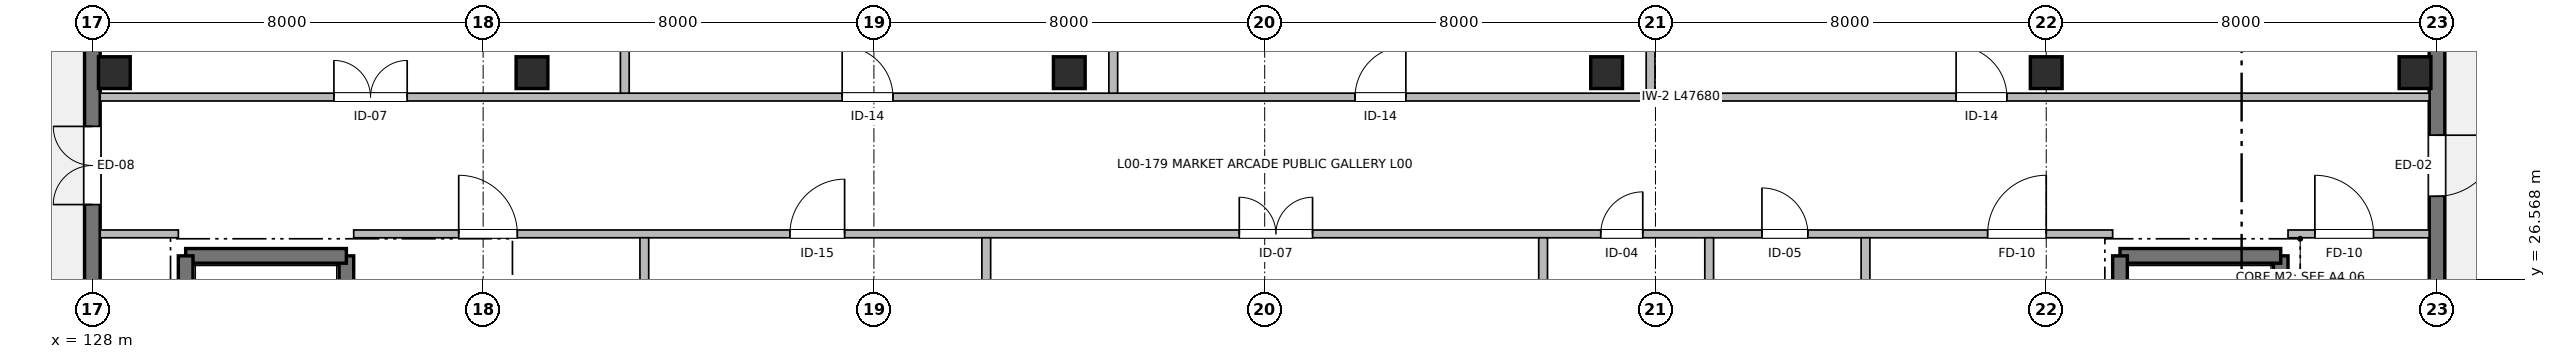
"""IFC4 building model, lengths in metres.
Left out: names, types, materials, properties, quantities, classifications, styles, units other than length and angle.
Written with IfcOpenShell. Run it as: python <this file> out.ifc"""

import sys

from ifc_helpers import new_model, si_unit, direction, frame, frame_2d, origin, origin_2d, place, context, subcontext, project, spatial, rectangle, extrude, element, fill, save


model = new_model("IFC4")
c1 = context("Model", 3, precision=1e-05, world=origin(), true_north=direction((0.0, 1.0)))
c2 = subcontext(c1, "Body", "Model", "MODEL_VIEW")
j1 = project(units=[si_unit("LENGTHUNIT", "METRE"), si_unit("PLANEANGLEUNIT", "RADIAN")], contexts=[c1])
p1 = place(None, origin())
s1 = spatial("IfcSite", under=j1, at=p1, CompositionType="ELEMENT")
p2 = place(p1, origin())
s2 = spatial("IfcBuilding", under=s1, at=p2, CompositionType="ELEMENT")
p3 = place(p2, origin())
s3 = spatial("IfcBuildingStorey", under=s2, at=p3, CompositionType="ELEMENT", Elevation=0.0)
for number, where, z_axis, x_axis in (
    (1, (128.45, 30.8, 0.0), (0.0, 0.0, 1.0), (1.0, 0.0, 0.0)),
    (2, (137.0, 30.8, 0.0), (0.0, 0.0, 1.0), (1.0, 0.0, 0.0)),
    (3, (148.0, 30.8, 0.0), (0.0, 0.0, 1.0), (1.0, 0.0, 0.0)),
    (4, (159.0, 30.8, 0.0), (0.0, 0.0, 1.0), (1.0, 0.0, 0.0)),
    (5, (168.0, 30.8, 0.0), (0.0, 0.0, 1.0), (1.0, 0.0, 0.0)),
    (6, (175.55, 30.8, 0.0), (0.0, 0.0, 1.0), (1.0, 0.0, 0.0)),
):
    element("IfcColumn", number, at=place(p3, frame(where, z_axis=z_axis, x_axis=x_axis)), inside=s3, PredefinedType="COLUMN", context=c2, shape_type="SweptSolid", body=[
        extrude(rectangle(XDim=0.65, YDim=0.65, at=origin_2d()), origin(), (0.0, 0.0, 1.0), 4.16),
    ])
p4 = place(p3, frame((128.0, 12.0, 0.0), z_axis=(0.0, 0.0, 1.0), x_axis=(0.0, 1.0, 0.0)))
e7 = element("IfcWall", 7, at=p4, inside=s3, PredefinedType="SHEAR", context=c2, shape_type="SweptSolid", body=[
    extrude(rectangle(XDim=28.0, YDim=0.32, at=frame_2d((14.0, 0.0))), origin(), (0.0, 0.0, 1.0), 3.9),
])
p5 = place(p4, frame((16.1, 0.0, 0.0)))
e8 = element("IfcOpeningElement", 8, at=p5, cuts=e7, PredefinedType="OPENING", context=c2, shape_type="SweptSolid", body=[
    extrude(rectangle(XDim=1.6, YDim=2.35, at=frame_2d((0.8, 1.175))), frame((0.0, 0.17, 0.0), z_axis=(0.0, -1.0, 0.0), x_axis=(1.0, 0.0, 0.0)), (0.0, 0.0, 1.0), 0.34),
])
p6 = place(p3, frame((176.0, 40.0, 0.0), z_axis=(0.0, 0.0, 1.0), x_axis=(0.0, -1.0, 0.0)))
e9 = element("IfcWall", 9, at=p6, inside=s3, PredefinedType="SHEAR", context=c2, shape_type="SweptSolid", body=[
    extrude(rectangle(XDim=28.0, YDim=0.32, at=frame_2d((14.0, 0.0))), origin(), (0.0, 0.0, 1.0), 3.9),
])
p7 = place(p6, frame((10.48, 0.0, 0.0)))
e10 = element("IfcOpeningElement", 10, at=p7, cuts=e9, PredefinedType="OPENING", context=c2, shape_type="SweptSolid", body=[
    extrude(rectangle(XDim=1.25, YDim=2.2, at=frame_2d((0.625, 1.1))), frame((0.0, 0.17, 0.0), z_axis=(0.0, -1.0, 0.0), x_axis=(1.0, 0.0, 0.0)), (0.0, 0.0, 1.0), 0.34),
])
p8 = place(p3, frame((133.2, 27.05, 0.0), z_axis=(0.0, 0.0, 1.0), x_axis=(0.0, -1.0, 0.0)))
e11 = element("IfcWall", 11, at=p8, inside=s3, PredefinedType="SHEAR", context=c2, shape_type="SweptSolid", body=[
    extrude(rectangle(XDim=6.9, YDim=0.3, at=frame_2d((3.45, 0.0))), origin(), (0.0, 0.0, 1.0), 4.16),
])
p9 = place(p8, frame((5.3, 0.0, 0.0)))
e12 = element("IfcOpeningElement", 12, at=p9, cuts=e11, PredefinedType="OPENING", context=c2, shape_type="SweptSolid", body=[
    extrude(rectangle(XDim=1.2, YDim=2.2, at=frame_2d((0.6, 1.1))), frame((0.0, 0.16, 0.0), z_axis=(0.0, -1.0, 0.0), x_axis=(1.0, 0.0, 0.0)), (0.0, 0.0, 1.0), 0.32),
])
p10 = place(p3, frame((129.91, 27.05, 0.0), z_axis=(0.0, 0.0, 1.0), x_axis=(1.0, 0.0, 0.0)))
e13 = element("IfcWall", 13, at=p10, inside=s3, PredefinedType="SHEAR", context=c2, shape_type="SweptSolid", body=[
    extrude(rectangle(XDim=3.29, YDim=0.3, at=frame_2d((1.645, 0.0))), origin(), (0.0, 0.0, 1.0), 4.16),
])
for number, where, z_axis, x_axis in (
    (14, (129.91, 20.15, 0.0), (0.0, 0.0, 1.0), (0.0, 1.0, 0.0)),
    (15, (172.8, 27.05, 0.0), (0.0, 0.0, 1.0), (0.0, -1.0, 0.0)),
):
    element("IfcWall", number, at=place(p3, frame(where, z_axis=z_axis, x_axis=x_axis)), inside=s3, PredefinedType="SHEAR", context=c2, shape_type="SweptSolid", body=[
        extrude(rectangle(XDim=6.9, YDim=0.3, at=frame_2d((3.45, 0.0))), origin(), (0.0, 0.0, 1.0), 4.16),
    ])
p11 = place(p3, frame((169.51, 27.05, 0.0), z_axis=(0.0, 0.0, 1.0), x_axis=(1.0, 0.0, 0.0)))
e16 = element("IfcWall", 16, at=p11, inside=s3, PredefinedType="SHEAR", context=c2, shape_type="SweptSolid", body=[
    extrude(rectangle(XDim=3.29, YDim=0.3, at=frame_2d((1.645, 0.0))), origin(), (0.0, 0.0, 1.0), 4.16),
])
p12 = place(p3, frame((169.51, 20.15, 0.0), z_axis=(0.0, 0.0, 1.0), x_axis=(0.0, 1.0, 0.0)))
e17 = element("IfcWall", 17, at=p12, inside=s3, PredefinedType="SHEAR", context=c2, shape_type="SweptSolid", body=[
    extrude(rectangle(XDim=6.9, YDim=0.3, at=frame_2d((3.45, 0.0))), origin(), (0.0, 0.0, 1.0), 4.16),
])
p13 = place(p12, frame((0.7, 0.0, 0.0)))
e18 = element("IfcOpeningElement", 18, at=p13, cuts=e17, PredefinedType="OPENING", context=c2, shape_type="SweptSolid", body=[
    extrude(rectangle(XDim=1.2, YDim=2.2, at=frame_2d((0.6, 1.1))), frame((0.0, 0.16, 0.0), z_axis=(0.0, -1.0, 0.0), x_axis=(1.0, 0.0, 0.0)), (0.0, 0.0, 1.0), 0.32),
])
p14 = place(p3, frame((128.16, 27.5, 0.0), z_axis=(0.0, 0.0, 1.0), x_axis=(1.0, 0.0, 0.0)))
e19 = element("IfcWall", 19, at=p14, inside=s3, PredefinedType="PARTITIONING", context=c2, shape_type="SweptSolid", body=[
    extrude(rectangle(XDim=1.6, YDim=0.16, at=frame_2d((0.8, 0.0))), origin(), (0.0, 0.0, 1.0), 3.89),
])
p15 = place(p3, frame((133.35, 27.5, 0.0), z_axis=(0.0, 0.0, 1.0), x_axis=(1.0, 0.0, 0.0)))
e20 = element("IfcWall", 20, at=p15, inside=s3, PredefinedType="PARTITIONING", context=c2, shape_type="SweptSolid", body=[
    extrude(rectangle(XDim=36.01, YDim=0.16, at=frame_2d((18.005, 0.0))), origin(), (0.0, 0.0, 1.0), 3.89),
])
p16 = place(p15, frame((2.15, 0.0, 0.0)))
e21 = element("IfcOpeningElement", 21, at=p16, cuts=e20, PredefinedType="OPENING", context=c2, shape_type="SweptSolid", body=[
    extrude(rectangle(XDim=1.2, YDim=2.2, at=frame_2d((0.6, 1.1))), frame((0.0, 0.09, 0.0), z_axis=(0.0, -1.0, 0.0), x_axis=(1.0, 0.0, 0.0)), (0.0, 0.0, 1.0), 0.18),
])
p17 = place(p15, frame((33.45, 0.0, 0.0)))
e22 = element("IfcOpeningElement", 22, at=p17, cuts=e20, PredefinedType="OPENING", context=c2, shape_type="SweptSolid", body=[
    extrude(rectangle(XDim=1.2, YDim=2.2, at=frame_2d((0.6, 1.1))), frame((0.0, 0.09, 0.0), z_axis=(0.0, -1.0, 0.0), x_axis=(1.0, 0.0, 0.0)), (0.0, 0.0, 1.0), 0.18),
])
p18 = place(p15, frame((8.93, 0.0, 0.0)))
e23 = element("IfcOpeningElement", 23, at=p18, cuts=e20, PredefinedType="OPENING", context=c2, shape_type="SweptSolid", body=[
    extrude(rectangle(XDim=1.12, YDim=2.2, at=frame_2d((0.56, 1.1))), frame((0.0, 0.09, 0.0), z_axis=(0.0, -1.0, 0.0), x_axis=(1.0, 0.0, 0.0)), (0.0, 0.0, 1.0), 0.18),
])
p19 = place(p15, frame((18.13, 0.0, 0.0)))
e24 = element("IfcOpeningElement", 24, at=p19, cuts=e20, PredefinedType="OPENING", context=c2, shape_type="SweptSolid", body=[
    extrude(rectangle(XDim=1.5, YDim=2.2, at=frame_2d((0.75, 1.1))), frame((0.0, 0.09, 0.0), z_axis=(0.0, -1.0, 0.0), x_axis=(1.0, 0.0, 0.0)), (0.0, 0.0, 1.0), 0.18),
])
p20 = place(p15, frame((25.53, 0.0, 0.0)))
e25 = element("IfcOpeningElement", 25, at=p20, cuts=e20, PredefinedType="OPENING", context=c2, shape_type="SweptSolid", body=[
    extrude(rectangle(XDim=0.86, YDim=2.1, at=frame_2d((0.43, 1.05))), frame((0.0, 0.09, 0.0), z_axis=(0.0, -1.0, 0.0), x_axis=(1.0, 0.0, 0.0)), (0.0, 0.0, 1.0), 0.18),
])
p21 = place(p15, frame((28.83, 0.0, 0.0)))
e26 = element("IfcOpeningElement", 26, at=p21, cuts=e20, PredefinedType="OPENING", context=c2, shape_type="SweptSolid", body=[
    extrude(rectangle(XDim=0.94, YDim=2.1, at=frame_2d((0.47, 1.05))), frame((0.0, 0.09, 0.0), z_axis=(0.0, -1.0, 0.0), x_axis=(1.0, 0.0, 0.0)), (0.0, 0.0, 1.0), 0.18),
])
p22 = place(p3, frame((172.95, 27.5, 0.0), z_axis=(0.0, 0.0, 1.0), x_axis=(1.0, 0.0, 0.0)))
e27 = element("IfcWall", 27, at=p22, inside=s3, PredefinedType="PARTITIONING", context=c2, shape_type="SweptSolid", body=[
    extrude(rectangle(XDim=2.89, YDim=0.16, at=frame_2d((1.445, 0.0))), origin(), (0.0, 0.0, 1.0), 3.89),
])
p23 = place(p22, frame((0.55, 0.0, 0.0)))
e28 = element("IfcOpeningElement", 28, at=p23, cuts=e27, PredefinedType="OPENING", context=c2, shape_type="SweptSolid", body=[
    extrude(rectangle(XDim=1.2, YDim=2.2, at=frame_2d((0.6, 1.1))), frame((0.0, 0.09, 0.0), z_axis=(0.0, -1.0, 0.0), x_axis=(1.0, 0.0, 0.0)), (0.0, 0.0, 1.0), 0.18),
])
p24 = place(p3, frame((128.16, 30.3, 0.0), z_axis=(0.0, 0.0, 1.0), x_axis=(1.0, 0.0, 0.0)))
e29 = element("IfcWall", 29, at=p24, inside=s3, PredefinedType="PARTITIONING", context=c2, shape_type="SweptSolid", body=[
    extrude(rectangle(XDim=47.68, YDim=0.16, at=frame_2d((23.84, 0.0))), origin(), (0.0, 0.0, 1.0), 3.89),
])
p25 = place(p24, frame((4.785, 0.0, 0.0)))
e30 = element("IfcOpeningElement", 30, at=p25, cuts=e29, PredefinedType="OPENING", context=c2, shape_type="SweptSolid", body=[
    extrude(rectangle(XDim=1.5, YDim=2.2, at=frame_2d((0.75, 1.1))), frame((0.0, 0.09, 0.0), z_axis=(0.0, -1.0, 0.0), x_axis=(1.0, 0.0, 0.0)), (0.0, 0.0, 1.0), 0.18),
])
p26 = place(p24, frame((15.19, 0.0, 0.0)))
e31 = element("IfcOpeningElement", 31, at=p26, cuts=e29, PredefinedType="OPENING", context=c2, shape_type="SweptSolid", body=[
    extrude(rectangle(XDim=1.04, YDim=2.15, at=frame_2d((0.52, 1.075))), frame((0.0, 0.09, 0.0), z_axis=(0.0, -1.0, 0.0), x_axis=(1.0, 0.0, 0.0)), (0.0, 0.0, 1.0), 0.18),
])
p27 = place(p24, frame((25.69, 0.0, 0.0)))
e32 = element("IfcOpeningElement", 32, at=p27, cuts=e29, PredefinedType="OPENING", context=c2, shape_type="SweptSolid", body=[
    extrude(rectangle(XDim=1.04, YDim=2.15, at=frame_2d((0.52, 1.075))), frame((0.0, 0.09, 0.0), z_axis=(0.0, -1.0, 0.0), x_axis=(1.0, 0.0, 0.0)), (0.0, 0.0, 1.0), 0.18),
])
p28 = place(p24, frame((37.995, 0.0, 0.0)))
e33 = element("IfcOpeningElement", 33, at=p28, cuts=e29, PredefinedType="OPENING", context=c2, shape_type="SweptSolid", body=[
    extrude(rectangle(XDim=1.04, YDim=2.15, at=frame_2d((0.52, 1.075))), frame((0.0, 0.09, 0.0), z_axis=(0.0, -1.0, 0.0), x_axis=(1.0, 0.0, 0.0)), (0.0, 0.0, 1.0), 0.18),
])
for number, where, z_axis, x_axis in (
    (34, (139.3, 12.2, 0.0), (0.0, 0.0, 1.0), (0.0, 1.0, 0.0)),
    (35, (164.3, 12.2, 0.0), (0.0, 0.0, 1.0), (0.0, 1.0, 0.0)),
):
    element("IfcWall", number, at=place(p3, frame(where, z_axis=z_axis, x_axis=x_axis)), inside=s3, PredefinedType="PARTITIONING", context=c2, shape_type="SweptSolid", body=[
        extrude(rectangle(XDim=15.22, YDim=0.18, at=frame_2d((7.61, 0.0))), origin(), (0.0, 0.0, 1.0), 3.89),
    ])
for number, where, z_axis, x_axis in (
    (36, (138.9, 30.38, 0.0), (0.0, 0.0, 1.0), (0.0, 1.0, 0.0)),
    (37, (148.9, 30.38, 0.0), (0.0, 0.0, 1.0), (0.0, 1.0, 0.0)),
    (38, (159.9, 30.38, 0.0), (0.0, 0.0, 1.0), (0.0, 1.0, 0.0)),
):
    element("IfcWall", number, at=place(p3, frame(where, z_axis=z_axis, x_axis=x_axis)), inside=s3, PredefinedType="PARTITIONING", context=c2, shape_type="SweptSolid", body=[
        extrude(rectangle(XDim=9.5, YDim=0.18, at=frame_2d((4.75, 0.0))), origin(), (0.0, 0.0, 1.0), 3.89),
    ])
for number, where, z_axis, x_axis in (
    (39, (146.3, 12.2, 0.0), (0.0, 0.0, 1.0), (0.0, 1.0, 0.0)),
    (40, (157.7, 12.2, 0.0), (0.0, 0.0, 1.0), (0.0, 1.0, 0.0)),
    (41, (161.1, 12.2, 0.0), (0.0, 0.0, 1.0), (0.0, 1.0, 0.0)),
):
    element("IfcWall", number, at=place(p3, frame(where, z_axis=z_axis, x_axis=x_axis)), inside=s3, PredefinedType="PARTITIONING", context=c2, shape_type="SweptSolid", body=[
        extrude(rectangle(XDim=15.22, YDim=0.18, at=frame_2d((7.61, 0.0))), origin(), (0.0, 0.0, 1.0), 3.89),
    ])
p29 = place(p5, origin())
e42 = element("IfcDoor", 42, at=p29, inside=s3, OperationType="DOUBLE_DOOR_SINGLE_SWING", PredefinedType="DOOR", context=c2, shape_type="SweptSolid", body=[
    extrude(rectangle(XDim=1.6, YDim=2.35, at=frame_2d((0.8, 1.175))), frame((0.0, 0.025, 0.0), z_axis=(0.0, -1.0, 0.0), x_axis=(1.0, 0.0, 0.0)), (0.0, 0.0, 1.0), 0.05),
])
fill(e8, e42)
p30 = place(p7, origin())
e43 = element("IfcDoor", 43, at=p30, inside=s3, OperationType="SINGLE_SWING_LEFT", PredefinedType="DOOR", context=c2, shape_type="SweptSolid", body=[
    extrude(rectangle(XDim=1.25, YDim=2.2, at=frame_2d((0.625, 1.1))), frame((0.0, 0.025, 0.0), z_axis=(0.0, -1.0, 0.0), x_axis=(1.0, 0.0, 0.0)), (0.0, 0.0, 1.0), 0.05),
])
fill(e10, e43)
p31 = place(p16, origin())
e44 = element("IfcDoor", 44, at=p31, inside=s3, OperationType="SINGLE_SWING_LEFT", PredefinedType="DOOR", context=c2, shape_type="SweptSolid", body=[
    extrude(rectangle(XDim=1.2, YDim=2.2, at=frame_2d((0.6, 1.1))), frame((0.0, 0.025, 0.0), z_axis=(0.0, -1.0, 0.0), x_axis=(1.0, 0.0, 0.0)), (0.0, 0.0, 1.0), 0.05),
])
fill(e21, e44)
p32 = place(p17, origin())
e45 = element("IfcDoor", 45, at=p32, inside=s3, OperationType="SINGLE_SWING_RIGHT", PredefinedType="DOOR", context=c2, shape_type="SweptSolid", body=[
    extrude(rectangle(XDim=1.2, YDim=2.2, at=frame_2d((0.6, 1.1))), frame((0.0, 0.025, 0.0), z_axis=(0.0, -1.0, 0.0), x_axis=(1.0, 0.0, 0.0)), (0.0, 0.0, 1.0), 0.05),
])
fill(e22, e45)
p33 = place(p23, origin())
e46 = element("IfcDoor", 46, at=p33, inside=s3, OperationType="SINGLE_SWING_LEFT", PredefinedType="DOOR", context=c2, shape_type="SweptSolid", body=[
    extrude(rectangle(XDim=1.2, YDim=2.2, at=frame_2d((0.6, 1.1))), frame((0.0, 0.025, 0.0), z_axis=(0.0, -1.0, 0.0), x_axis=(1.0, 0.0, 0.0)), (0.0, 0.0, 1.0), 0.05),
])
fill(e28, e46)
p34 = place(p25, origin())
e47 = element("IfcDoor", 47, at=p34, inside=s3, OperationType="DOUBLE_DOOR_SINGLE_SWING", PredefinedType="DOOR", context=c2, shape_type="SweptSolid", body=[
    extrude(rectangle(XDim=1.5, YDim=2.2, at=frame_2d((0.75, 1.1))), frame((0.0, 0.025, 0.0), z_axis=(0.0, -1.0, 0.0), x_axis=(1.0, 0.0, 0.0)), (0.0, 0.0, 1.0), 0.05),
])
fill(e30, e47)
p35 = place(p26, origin())
e48 = element("IfcDoor", 48, at=p35, inside=s3, OperationType="SINGLE_SWING_LEFT", PredefinedType="DOOR", context=c2, shape_type="SweptSolid", body=[
    extrude(rectangle(XDim=1.04, YDim=2.15, at=frame_2d((0.52, 1.075))), frame((0.0, 0.025, 0.0), z_axis=(0.0, -1.0, 0.0), x_axis=(1.0, 0.0, 0.0)), (0.0, 0.0, 1.0), 0.05),
])
fill(e31, e48)
p36 = place(p27, origin())
e49 = element("IfcDoor", 49, at=p36, inside=s3, OperationType="SINGLE_SWING_RIGHT", PredefinedType="DOOR", context=c2, shape_type="SweptSolid", body=[
    extrude(rectangle(XDim=1.04, YDim=2.15, at=frame_2d((0.52, 1.075))), frame((0.0, 0.025, 0.0), z_axis=(0.0, -1.0, 0.0), x_axis=(1.0, 0.0, 0.0)), (0.0, 0.0, 1.0), 0.05),
])
fill(e32, e49)
p37 = place(p28, origin())
e50 = element("IfcDoor", 50, at=p37, inside=s3, OperationType="SINGLE_SWING_LEFT", PredefinedType="DOOR", context=c2, shape_type="SweptSolid", body=[
    extrude(rectangle(XDim=1.04, YDim=2.15, at=frame_2d((0.52, 1.075))), frame((0.0, 0.025, 0.0), z_axis=(0.0, -1.0, 0.0), x_axis=(1.0, 0.0, 0.0)), (0.0, 0.0, 1.0), 0.05),
])
fill(e33, e50)
p38 = place(p18, origin())
e51 = element("IfcDoor", 51, at=p38, inside=s3, OperationType="SINGLE_SWING_RIGHT", PredefinedType="DOOR", context=c2, shape_type="SweptSolid", body=[
    extrude(rectangle(XDim=1.12, YDim=2.2, at=frame_2d((0.56, 1.1))), frame((0.0, 0.025, 0.0), z_axis=(0.0, -1.0, 0.0), x_axis=(1.0, 0.0, 0.0)), (0.0, 0.0, 1.0), 0.05),
])
fill(e23, e51)
p39 = place(p19, origin())
e52 = element("IfcDoor", 52, at=p39, inside=s3, OperationType="DOUBLE_DOOR_SINGLE_SWING", PredefinedType="DOOR", context=c2, shape_type="SweptSolid", body=[
    extrude(rectangle(XDim=1.5, YDim=2.2, at=frame_2d((0.75, 1.1))), frame((0.0, 0.025, 0.0), z_axis=(0.0, -1.0, 0.0), x_axis=(1.0, 0.0, 0.0)), (0.0, 0.0, 1.0), 0.05),
])
fill(e24, e52)
p40 = place(p20, origin())
e53 = element("IfcDoor", 53, at=p40, inside=s3, OperationType="SINGLE_SWING_RIGHT", PredefinedType="DOOR", context=c2, shape_type="SweptSolid", body=[
    extrude(rectangle(XDim=0.86, YDim=2.1, at=frame_2d((0.43, 1.05))), frame((0.0, 0.025, 0.0), z_axis=(0.0, -1.0, 0.0), x_axis=(1.0, 0.0, 0.0)), (0.0, 0.0, 1.0), 0.05),
])
fill(e25, e53)
p41 = place(p21, origin())
e54 = element("IfcDoor", 54, at=p41, inside=s3, OperationType="SINGLE_SWING_LEFT", PredefinedType="DOOR", context=c2, shape_type="SweptSolid", body=[
    extrude(rectangle(XDim=0.94, YDim=2.1, at=frame_2d((0.47, 1.05))), frame((0.0, 0.025, 0.0), z_axis=(0.0, -1.0, 0.0), x_axis=(1.0, 0.0, 0.0)), (0.0, 0.0, 1.0), 0.05),
])
fill(e26, e54)
save(model, sys.argv[1])
